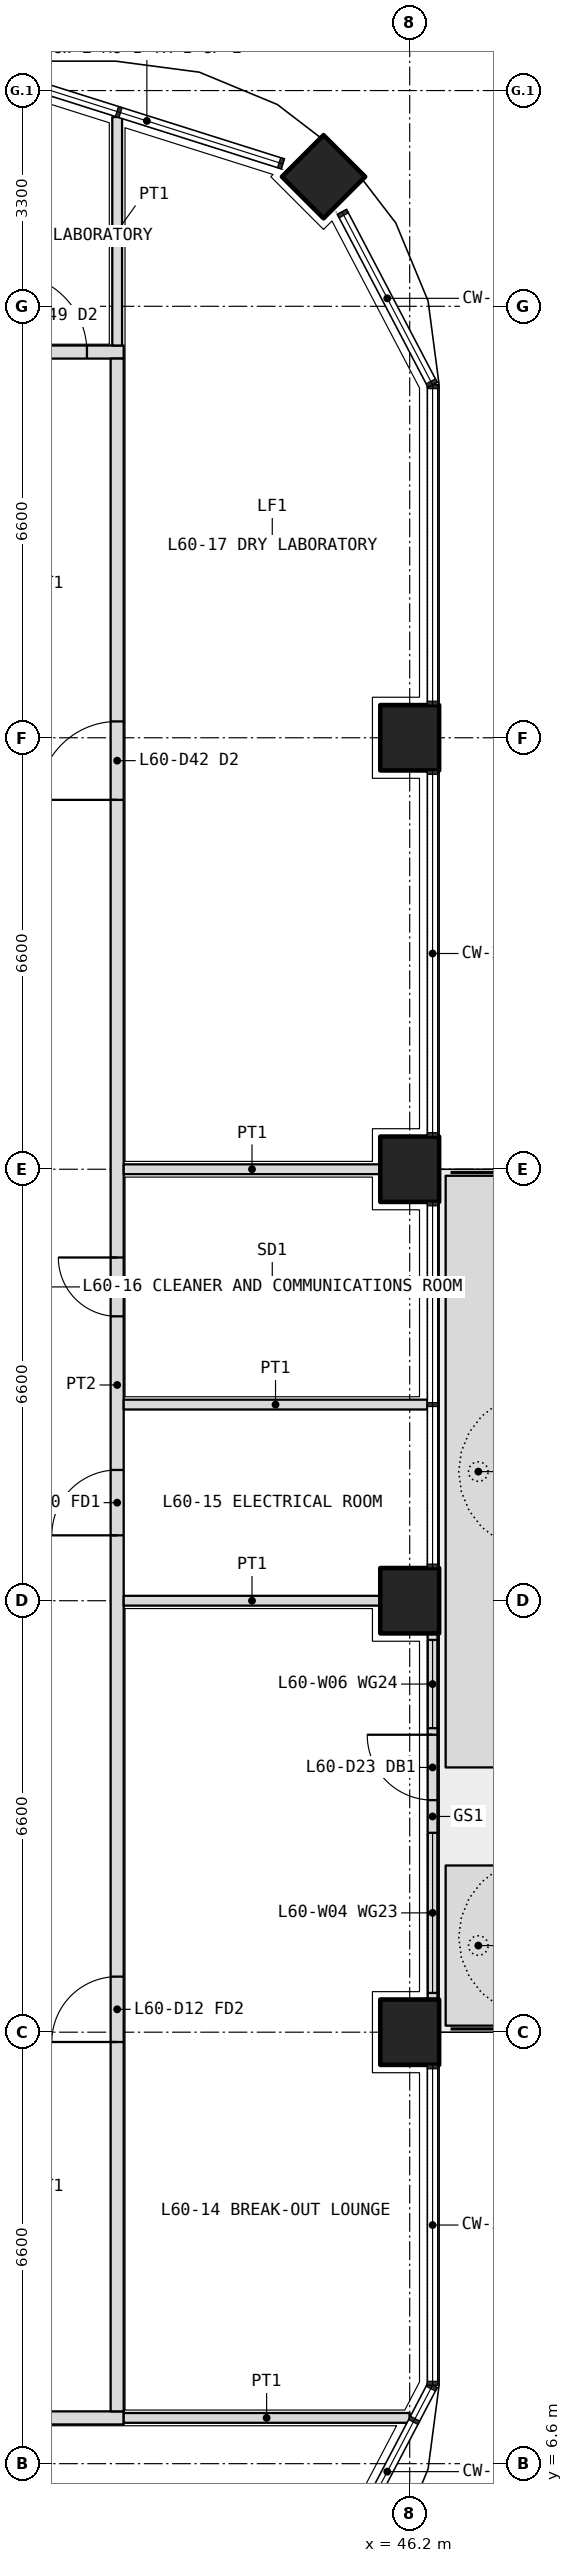
"""IFC4 building model, lengths in metres.
Left out: names, types, materials, properties, quantities, classifications, styles, units other than length and angle.
Written with IfcOpenShell. Run it as: python <this file> out.ifc"""

import sys

from ifc_helpers import new_model, si_unit, direction, frame, frame_2d, origin, origin_2d, place, context, subcontext, project, spatial, polyline, rectangle, outline, extrude, element, fill, save


model = new_model("IFC4")
c1 = context("Model", 3, precision=1e-05, world=origin(), true_north=direction((0.0, 1.0)))
c2 = subcontext(c1, "Body", "Model", "MODEL_VIEW")
j1 = project(units=[si_unit("LENGTHUNIT", "METRE"), si_unit("PLANEANGLEUNIT", "RADIAN")], contexts=[c1])
p1 = place(None, origin())
s1 = spatial("IfcSite", under=j1, at=p1, CompositionType="ELEMENT")
p2 = place(p1, origin())
s2 = spatial("IfcBuilding", under=s1, at=p2, CompositionType="ELEMENT")
p3 = place(p2, frame((0.0, 0.0, 262.8)))
s3 = spatial("IfcBuildingStorey", under=s2, at=p3, CompositionType="ELEMENT", Elevation=262.8)
p4 = place(p3, frame((44.882, 41.582, 0.0), z_axis=(0.0, 0.0, 1.0), x_axis=(0.707106781187, 0.707106781187, 0.0)))
e1 = element("IfcColumn", 1, at=p4, inside=s3, PredefinedType="COLUMN", context=c2, shape_type="SweptSolid", body=[
    extrude(rectangle(XDim=0.9, YDim=0.9, at=origin_2d()), origin(), (0.0, 0.0, 1.0), 4.2),
])
for number, where, z_axis, x_axis in (
    (2, (46.2, 13.2, 0.0), (0.0, 0.0, 1.0), (0.0, 1.0, 0.0)),
    (3, (46.2, 19.8, 0.0), (0.0, 0.0, 1.0), (0.0, 1.0, 0.0)),
    (4, (46.2, 26.4, 0.0), (0.0, 0.0, 1.0), (0.0, 1.0, 0.0)),
    (5, (46.2, 33.0, 0.0), (0.0, 0.0, 1.0), (0.0, 1.0, 0.0)),
):
    element("IfcColumn", number, at=place(p3, frame(where, z_axis=z_axis, x_axis=x_axis)), inside=s3, PredefinedType="COLUMN", context=c2, shape_type="SweptSolid", body=[
        extrude(rectangle(XDim=1.0, YDim=0.9, at=origin_2d()), origin(), (0.0, 0.0, 1.0), 4.2),
    ])
p5 = place(p3, origin())
e6 = element("IfcWall", 6, at=p5, inside=s3, PredefinedType="USERDEFINED", context=c2, shape_type="SweptSolid", body=[
    extrude(outline(polyline([(46.75, 13.3), (47.75, 13.3), (47.75, 15.75), (46.75, 15.75), (46.75, 13.3)]), holes=[polyline([(46.9, 13.45), (47.6, 13.45), (47.6, 15.6), (46.9, 15.6), (46.9, 13.45)])]), origin(), (0.0, 0.0, 1.0), 1.05),
])
p6 = place(p3, origin())
e7 = element("IfcWall", 7, at=p6, inside=s3, PredefinedType="USERDEFINED", context=c2, shape_type="SweptSolid", body=[
    extrude(outline(polyline([(46.75, 17.25), (47.75, 17.25), (47.75, 26.3), (46.75, 26.3), (46.75, 17.25)]), holes=[polyline([(46.9, 17.4), (47.6, 17.4), (47.6, 26.15), (46.9, 26.15), (46.9, 17.4)])]), origin(), (0.0, 0.0, 1.0), 1.05),
])
p7 = place(p3, frame((46.55, 13.7, 0.0), z_axis=(0.0, 0.0, 1.0), x_axis=(0.0, 1.0, 0.0)))
e8 = element("IfcWall", 8, at=p7, inside=s3, PredefinedType="SOLIDWALL", context=c2, shape_type="SweptSolid", body=[
    extrude(rectangle(XDim=5.6, YDim=0.15, at=frame_2d((2.8, 0.0))), origin(), (0.0, 0.0, 1.0), 2.7),
])
p8 = place(p7, frame((3.05, 0.0, 0.0)))
e9 = element("IfcOpeningElement", 9, at=p8, cuts=e8, PredefinedType="OPENING", context=c2, shape_type="SweptSolid", body=[
    extrude(rectangle(XDim=1.0, YDim=2.4, at=frame_2d((0.5, 1.2))), frame((0.0, 0.085, 0.0), z_axis=(0.0, -1.0, 0.0), x_axis=(1.0, 0.0, 0.0)), (0.0, 0.0, 1.0), 0.17),
])
p9 = place(p7, frame((0.1, 0.0, 0.1)))
e10 = element("IfcOpeningElement", 10, at=p9, cuts=e8, PredefinedType="OPENING", context=c2, shape_type="SweptSolid", body=[
    extrude(rectangle(XDim=2.45, YDim=2.3, at=frame_2d((1.225, 1.15))), frame((0.0, 0.085, 0.0), z_axis=(0.0, -1.0, 0.0), x_axis=(1.0, 0.0, 0.0)), (0.0, 0.0, 1.0), 0.17),
])
p10 = place(p7, frame((4.15, 0.0, 0.1)))
e11 = element("IfcOpeningElement", 11, at=p10, cuts=e8, PredefinedType="OPENING", context=c2, shape_type="SweptSolid", body=[
    extrude(rectangle(XDim=1.35, YDim=2.3, at=frame_2d((0.675, 1.15))), frame((0.0, 0.085, 0.0), z_axis=(0.0, -1.0, 0.0), x_axis=(1.0, 0.0, 0.0)), (0.0, 0.0, 1.0), 0.17),
])
p11 = place(p3, frame((19.8, 7.3, 0.0), z_axis=(0.0, 0.0, 1.0), x_axis=(1.0, 0.0, 0.0)))
e12 = element("IfcWall", 12, at=p11, inside=s3, PredefinedType="PARTITIONING", context=c2, shape_type="SweptSolid", body=[
    extrude(rectangle(XDim=22.025, YDim=0.2, at=frame_2d((11.012, 0.0))), origin(), (0.0, 0.0, 1.0), 3.0),
])
p12 = place(p11, frame((1.15, 0.0, 0.0)))
e13 = element("IfcOpeningElement", 13, at=p12, cuts=e12, PredefinedType="OPENING", context=c2, shape_type="SweptSolid", body=[
    extrude(rectangle(XDim=1.0, YDim=2.1, at=frame_2d((0.5, 1.05))), frame((0.0, 0.11, 0.0), z_axis=(0.0, -1.0, 0.0), x_axis=(1.0, 0.0, 0.0)), (0.0, 0.0, 1.0), 0.22),
])
p13 = place(p11, frame((4.9, 0.0, 0.0)))
e14 = element("IfcOpeningElement", 14, at=p13, cuts=e12, PredefinedType="OPENING", context=c2, shape_type="SweptSolid", body=[
    extrude(rectangle(XDim=1.0, YDim=2.1, at=frame_2d((0.5, 1.05))), frame((0.0, 0.11, 0.0), z_axis=(0.0, -1.0, 0.0), x_axis=(1.0, 0.0, 0.0)), (0.0, 0.0, 1.0), 0.22),
])
p14 = place(p11, frame((8.2, 0.0, 0.0)))
e15 = element("IfcOpeningElement", 15, at=p14, cuts=e12, PredefinedType="OPENING", context=c2, shape_type="SweptSolid", body=[
    extrude(rectangle(XDim=1.0, YDim=2.1, at=frame_2d((0.5, 1.05))), frame((0.0, 0.11, 0.0), z_axis=(0.0, -1.0, 0.0), x_axis=(1.0, 0.0, 0.0)), (0.0, 0.0, 1.0), 0.22),
])
p15 = place(p11, frame((15.413, 0.0, 0.0)))
e16 = element("IfcOpeningElement", 16, at=p15, cuts=e12, PredefinedType="OPENING", context=c2, shape_type="SweptSolid", body=[
    extrude(rectangle(XDim=1.0, YDim=2.1, at=frame_2d((0.5, 1.05))), frame((0.0, 0.11, 0.0), z_axis=(0.0, -1.0, 0.0), x_axis=(1.0, 0.0, 0.0)), (0.0, 0.0, 1.0), 0.22),
])
p16 = place(p3, frame((10.975, 38.9, 0.0), z_axis=(0.0, 0.0, 1.0), x_axis=(1.0, 0.0, 0.0)))
e17 = element("IfcWall", 17, at=p16, inside=s3, PredefinedType="PARTITIONING", context=c2, shape_type="SweptSolid", body=[
    extrude(rectangle(XDim=30.85, YDim=0.2, at=frame_2d((15.425, 0.0))), origin(), (0.0, 0.0, 1.0), 3.0),
])
p17 = place(p16, frame((7.262, 0.0, 0.0)))
e18 = element("IfcOpeningElement", 18, at=p17, cuts=e17, PredefinedType="OPENING", context=c2, shape_type="SweptSolid", body=[
    extrude(rectangle(XDim=1.0, YDim=2.1, at=frame_2d((0.5, 1.05))), frame((0.0, 0.11, 0.0), z_axis=(0.0, -1.0, 0.0), x_axis=(1.0, 0.0, 0.0)), (0.0, 0.0, 1.0), 0.22),
])
p18 = place(p16, frame((21.525, 0.0, 0.0)))
e19 = element("IfcOpeningElement", 19, at=p18, cuts=e17, PredefinedType="OPENING", context=c2, shape_type="SweptSolid", body=[
    extrude(rectangle(XDim=1.0, YDim=2.1, at=frame_2d((0.5, 1.05))), frame((0.0, 0.11, 0.0), z_axis=(0.0, -1.0, 0.0), x_axis=(1.0, 0.0, 0.0)), (0.0, 0.0, 1.0), 0.22),
])
p19 = place(p16, frame((29.087, 0.0, 0.0)))
e20 = element("IfcOpeningElement", 20, at=p19, cuts=e17, PredefinedType="OPENING", context=c2, shape_type="SweptSolid", body=[
    extrude(rectangle(XDim=1.2, YDim=2.1, at=frame_2d((0.6, 1.05))), frame((0.0, 0.11, 0.0), z_axis=(0.0, -1.0, 0.0), x_axis=(1.0, 0.0, 0.0)), (0.0, 0.0, 1.0), 0.22),
])
p20 = place(p3, frame((41.725, 7.4, 0.0), z_axis=(0.0, 0.0, 1.0), x_axis=(0.0, 1.0, 0.0)))
e21 = element("IfcWall", 21, at=p20, inside=s3, PredefinedType="PARTITIONING", context=c2, shape_type="SweptSolid", body=[
    extrude(rectangle(XDim=31.4, YDim=0.2, at=frame_2d((15.7, 0.0))), origin(), (0.0, 0.0, 1.0), 3.0),
])
p21 = place(p20, frame((5.65, 0.0, 0.0)))
e22 = element("IfcOpeningElement", 22, at=p21, cuts=e21, PredefinedType="OPENING", context=c2, shape_type="SweptSolid", body=[
    extrude(rectangle(XDim=1.0, YDim=2.1, at=frame_2d((0.5, 1.05))), frame((0.0, 0.11, 0.0), z_axis=(0.0, -1.0, 0.0), x_axis=(1.0, 0.0, 0.0)), (0.0, 0.0, 1.0), 0.22),
])
p22 = place(p20, frame((13.4, 0.0, 0.0)))
e23 = element("IfcOpeningElement", 23, at=p22, cuts=e21, PredefinedType="OPENING", context=c2, shape_type="SweptSolid", body=[
    extrude(rectangle(XDim=1.0, YDim=2.1, at=frame_2d((0.5, 1.05))), frame((0.0, 0.11, 0.0), z_axis=(0.0, -1.0, 0.0), x_axis=(1.0, 0.0, 0.0)), (0.0, 0.0, 1.0), 0.22),
])
p23 = place(p20, frame((16.75, 0.0, 0.0)))
e24 = element("IfcOpeningElement", 24, at=p23, cuts=e21, PredefinedType="OPENING", context=c2, shape_type="SweptSolid", body=[
    extrude(rectangle(XDim=0.9, YDim=2.1, at=frame_2d((0.45, 1.05))), frame((0.0, 0.11, 0.0), z_axis=(0.0, -1.0, 0.0), x_axis=(1.0, 0.0, 0.0)), (0.0, 0.0, 1.0), 0.22),
])
p24 = place(p20, frame((24.65, 0.0, 0.0)))
e25 = element("IfcOpeningElement", 25, at=p24, cuts=e21, PredefinedType="OPENING", context=c2, shape_type="SweptSolid", body=[
    extrude(rectangle(XDim=1.2, YDim=2.1, at=frame_2d((0.6, 1.05))), frame((0.0, 0.11, 0.0), z_axis=(0.0, -1.0, 0.0), x_axis=(1.0, 0.0, 0.0)), (0.0, 0.0, 1.0), 0.22),
])
p25 = place(p3, frame((46.198, 7.3, 0.0), z_axis=(0.0, 0.0, 1.0), x_axis=(-1.0, 0.0, 0.0)))
e26 = element("IfcWall", 26, at=p25, inside=s3, PredefinedType="PARTITIONING", context=c2, shape_type="SweptSolid", body=[
    extrude(rectangle(XDim=4.373, YDim=0.15, at=frame_2d((2.186, 0.0))), origin(), (0.0, 0.0, 1.0), 2.7),
])
p26 = place(p3, frame((41.725, 42.495, 0.0), z_axis=(0.0, 0.0, 1.0), x_axis=(0.0, -1.0, 0.0)))
e27 = element("IfcWall", 27, at=p26, inside=s3, PredefinedType="PARTITIONING", context=c2, shape_type="SweptSolid", body=[
    extrude(rectangle(XDim=3.495, YDim=0.15, at=frame_2d((1.748, 0.0))), origin(), (0.0, 0.0, 1.0), 2.7),
])
p27 = place(p3, frame((46.47, 22.8, 0.0), z_axis=(0.0, 0.0, 1.0), x_axis=(-1.0, 0.0, 0.0)))
e28 = element("IfcWall", 28, at=p27, inside=s3, PredefinedType="PARTITIONING", context=c2, shape_type="SweptSolid", body=[
    extrude(rectangle(XDim=4.645, YDim=0.15, at=frame_2d((2.323, 0.0))), origin(), (0.0, 0.0, 1.0), 2.7),
])
for number, where, z_axis, x_axis in (
    (29, (45.75, 26.4, 0.0), (0.0, 0.0, 1.0), (-1.0, 0.0, 0.0)),
    (30, (45.75, 19.8, 0.0), (0.0, 0.0, 1.0), (-1.0, 0.0, 0.0)),
):
    element("IfcWall", number, at=place(p3, frame(where, z_axis=z_axis, x_axis=x_axis)), inside=s3, PredefinedType="PARTITIONING", context=c2, shape_type="SweptSolid", body=[
        extrude(rectangle(XDim=3.925, YDim=0.15, at=frame_2d((1.962, 0.0))), origin(), (0.0, 0.0, 1.0), 3.0),
    ])
p28 = place(p8, origin())
e31 = element("IfcDoor", 31, at=p28, inside=s3, OperationType="SINGLE_SWING_RIGHT", PredefinedType="DOOR", context=c2, shape_type="SweptSolid", body=[
    extrude(rectangle(XDim=1.0, YDim=2.4, at=frame_2d((0.5, 1.2))), frame((0.0, 0.025, 0.0), z_axis=(0.0, -1.0, 0.0), x_axis=(1.0, 0.0, 0.0)), (0.0, 0.0, 1.0), 0.05),
])
fill(e9, e31)
p29 = place(p9, origin())
e32 = element("IfcWindow", 32, at=p29, inside=s3, PartitioningType="SINGLE_PANEL", PredefinedType="WINDOW", context=c2, shape_type="SweptSolid", body=[
    extrude(rectangle(XDim=2.45, YDim=2.3, at=frame_2d((1.225, 1.15))), frame((0.0, 0.03, 0.0), z_axis=(0.0, -1.0, 0.0), x_axis=(1.0, 0.0, 0.0)), (0.0, 0.0, 1.0), 0.06),
])
fill(e10, e32)
p30 = place(p10, origin())
e33 = element("IfcWindow", 33, at=p30, inside=s3, PartitioningType="SINGLE_PANEL", PredefinedType="WINDOW", context=c2, shape_type="SweptSolid", body=[
    extrude(rectangle(XDim=1.35, YDim=2.3, at=frame_2d((0.675, 1.15))), frame((0.0, 0.03, 0.0), z_axis=(0.0, -1.0, 0.0), x_axis=(1.0, 0.0, 0.0)), (0.0, 0.0, 1.0), 0.06),
])
fill(e11, e33)
p31 = place(p21, origin())
e34 = element("IfcDoor", 34, at=p31, inside=s3, OperationType="SINGLE_SWING_LEFT", PredefinedType="DOOR", context=c2, shape_type="SweptSolid", body=[
    extrude(rectangle(XDim=1.0, YDim=2.1, at=frame_2d((0.5, 1.05))), frame((0.0, 0.025, 0.0), z_axis=(0.0, -1.0, 0.0), x_axis=(1.0, 0.0, 0.0)), (0.0, 0.0, 1.0), 0.05),
])
fill(e22, e34)
p32 = place(p22, origin())
e35 = element("IfcDoor", 35, at=p32, inside=s3, OperationType="SINGLE_SWING_LEFT", PredefinedType="DOOR", context=c2, shape_type="SweptSolid", body=[
    extrude(rectangle(XDim=1.0, YDim=2.1, at=frame_2d((0.5, 1.05))), frame((0.0, 0.025, 0.0), z_axis=(0.0, -1.0, 0.0), x_axis=(1.0, 0.0, 0.0)), (0.0, 0.0, 1.0), 0.05),
])
fill(e23, e35)
p33 = place(p23, origin())
e36 = element("IfcDoor", 36, at=p33, inside=s3, OperationType="SINGLE_SWING_RIGHT", PredefinedType="DOOR", context=c2, shape_type="SweptSolid", body=[
    extrude(rectangle(XDim=0.9, YDim=2.1, at=frame_2d((0.45, 1.05))), frame((0.0, 0.025, 0.0), z_axis=(0.0, -1.0, 0.0), x_axis=(1.0, 0.0, 0.0)), (0.0, 0.0, 1.0), 0.05),
])
fill(e24, e36)
p34 = place(p24, origin())
e37 = element("IfcDoor", 37, at=p34, inside=s3, OperationType="DOUBLE_DOOR_SINGLE_SWING", PredefinedType="DOOR", context=c2, shape_type="SweptSolid", body=[
    extrude(rectangle(XDim=1.2, YDim=2.1, at=frame_2d((0.6, 1.05))), frame((0.0, 0.025, 0.0), z_axis=(0.0, -1.0, 0.0), x_axis=(1.0, 0.0, 0.0)), (0.0, 0.0, 1.0), 0.05),
])
fill(e25, e37)
p35 = place(p19, origin())
e38 = element("IfcDoor", 38, at=p35, inside=s3, OperationType="DOUBLE_DOOR_SINGLE_SWING", PredefinedType="DOOR", context=c2, shape_type="SweptSolid", body=[
    extrude(rectangle(XDim=1.2, YDim=2.1, at=frame_2d((0.6, 1.05))), frame((0.0, 0.025, 0.0), z_axis=(0.0, -1.0, 0.0), x_axis=(1.0, 0.0, 0.0)), (0.0, 0.0, 1.0), 0.05),
])
fill(e20, e38)
save(model, sys.argv[1])
